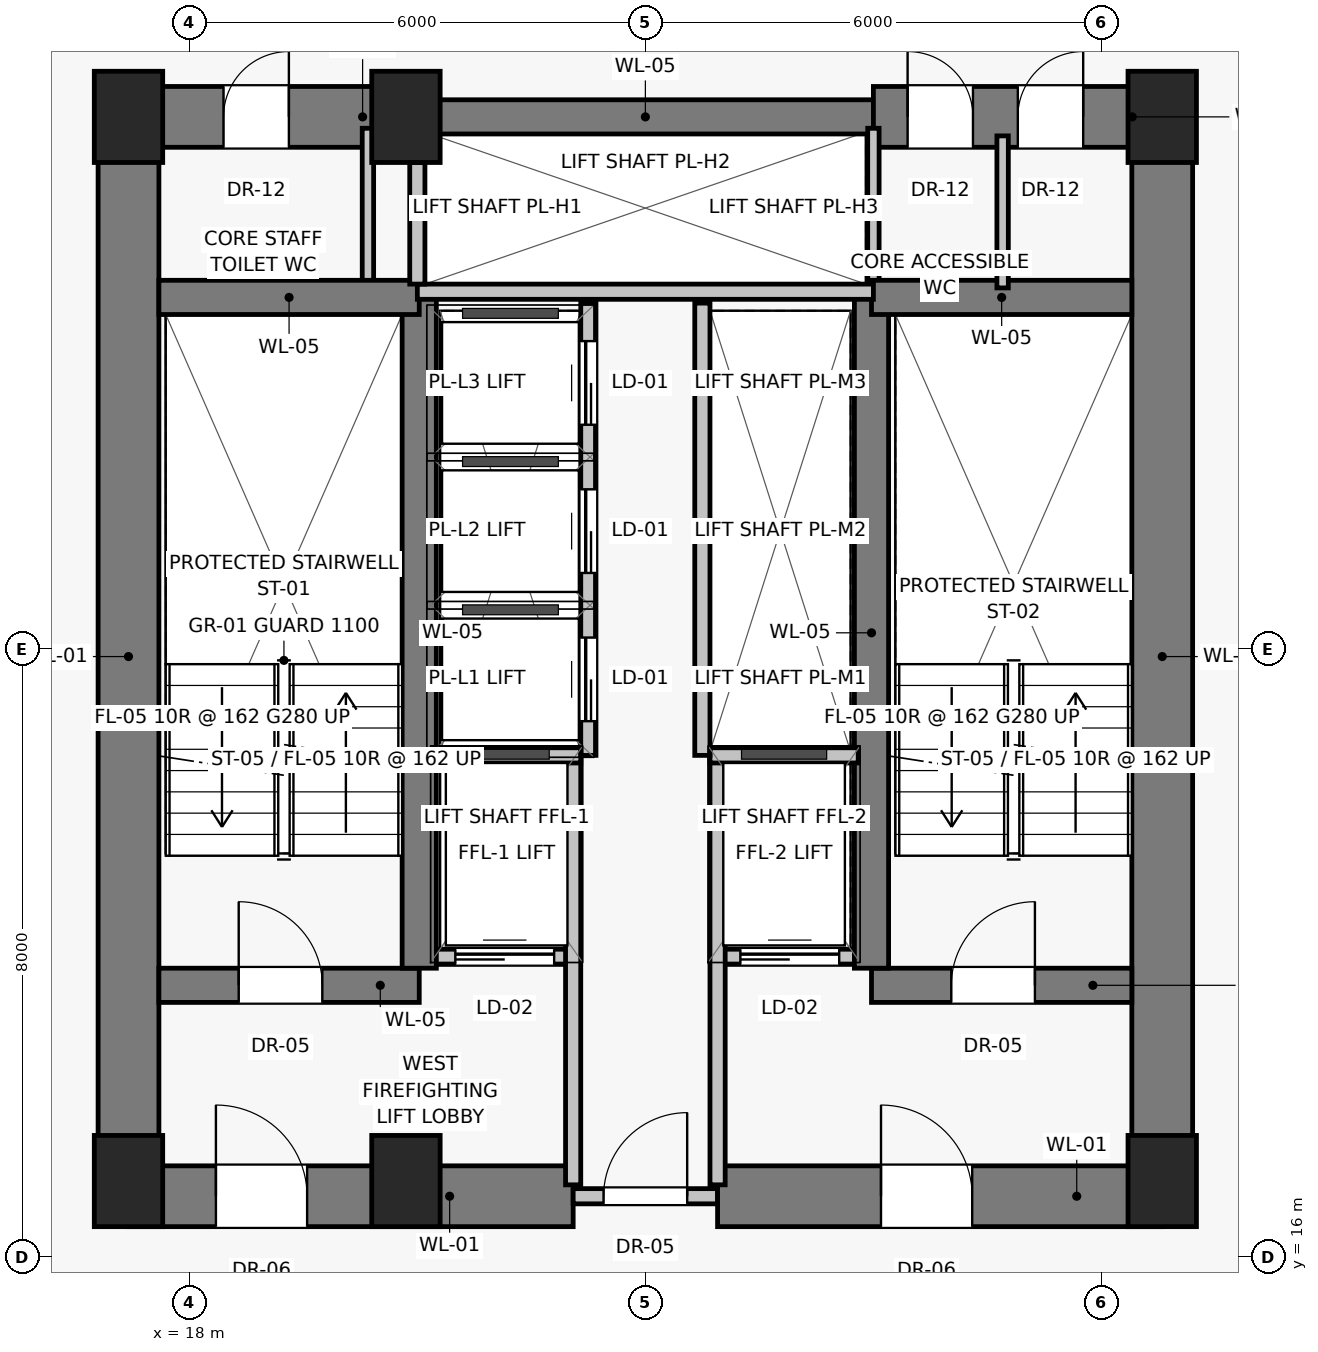
"""IFC4 building model, lengths in metres.
Left out: names, types, materials, properties, quantities, classifications, styles, units other than length and angle.
Written with IfcOpenShell. Run it as: python <this file> out.ifc"""

import sys

from ifc_helpers import new_model, si_unit, direction, frame, frame_2d, origin, origin_2d, place, context, subcontext, project, spatial, rectangle, extrude, source, transform, mapped, element, fill, save


model = new_model("IFC4")
c1 = context("Model", 3, precision=1e-05, world=origin(), true_north=direction((0.0, 1.0)))
c2 = subcontext(c1, "Body", "Model", "MODEL_VIEW")
j1 = project(units=[si_unit("LENGTHUNIT", "METRE"), si_unit("PLANEANGLEUNIT", "RADIAN")], contexts=[c1])
p1 = place(None, origin())
s1 = spatial("IfcSite", under=j1, at=p1, CompositionType="ELEMENT")
p2 = place(p1, origin())
s2 = spatial("IfcBuilding", under=s1, at=p2, CompositionType="ELEMENT")
p3 = place(p2, frame((0.0, 0.0, 64.1)))
s3 = spatial("IfcBuildingStorey", under=s2, at=p3, CompositionType="ELEMENT", Elevation=64.1)
for number, where, z_axis, x_axis in (
    (1, (17.2, 17.0, 0.0), (0.0, 0.0, 1.0), (1.0, 0.0, 0.0)),
    (2, (20.85, 17.0, 0.0), (0.0, 0.0, 1.0), (1.0, 0.0, 0.0)),
    (3, (30.8, 17.0, 0.0), (0.0, 0.0, 1.0), (1.0, 0.0, 0.0)),
    (4, (17.2, 31.0, 0.0), (0.0, 0.0, 1.0), (1.0, 0.0, 0.0)),
    (5, (20.85, 31.0, 0.0), (0.0, 0.0, 1.0), (1.0, 0.0, 0.0)),
    (6, (30.8, 31.0, 0.0), (0.0, 0.0, 1.0), (1.0, 0.0, 0.0)),
):
    element("IfcColumn", number, at=place(p3, frame(where, z_axis=z_axis, x_axis=x_axis)), inside=s3, PredefinedType="PILASTER", context=c2, shape_type="SweptSolid", body=[
        extrude(rectangle(XDim=0.9, YDim=1.2, at=origin_2d()), origin(), (0.0, 0.0, 1.0), 3.25),
    ])
for number, where, z_axis, x_axis in (
    (7, (17.2, 16.8, 0.0), (0.0, 0.0, 1.0), (0.0, 1.0, 0.0)),
    (8, (30.8, 16.8, 0.0), (0.0, 0.0, 1.0), (0.0, 1.0, 0.0)),
):
    element("IfcWall", number, at=place(p3, frame(where, z_axis=z_axis, x_axis=x_axis)), inside=s3, PredefinedType="SHEAR", context=c2, shape_type="SweptSolid", body=[
        extrude(rectangle(XDim=14.2, YDim=0.8, at=frame_2d((7.1, 0.0))), origin(), (0.0, 0.0, 1.0), 3.0),
    ])
p4 = place(p3, frame((17.2, 16.8, 0.0), z_axis=(0.0, 0.0, 1.0), x_axis=(1.0, 0.0, 0.0)))
e9 = element("IfcWall", 9, at=p4, inside=s3, PredefinedType="SHEAR", context=c2, shape_type="SweptSolid", body=[
    extrude(rectangle(XDim=5.85, YDim=0.8, at=frame_2d((2.925, 0.0))), origin(), (0.0, 0.0, 1.0), 3.0),
])
p5 = place(p4, frame((1.15, 0.0, 0.0)))
e10 = element("IfcOpeningElement", 10, at=p5, cuts=e9, PredefinedType="OPENING", context=c2, shape_type="SweptSolid", body=[
    extrude(rectangle(XDim=1.2, YDim=2.03, at=frame_2d((0.6, 1.015))), frame((0.0, 0.41, 0.0), z_axis=(0.0, -1.0, 0.0), x_axis=(1.0, 0.0, 0.0)), (0.0, 0.0, 1.0), 0.82),
])
p6 = place(p3, frame((23.05, 16.8, 0.0), z_axis=(0.0, 0.0, 1.0), x_axis=(1.0, 0.0, 0.0)))
e11 = element("IfcWall", 11, at=p6, inside=s3, PredefinedType="SOLIDWALL", context=c2, shape_type="SweptSolid", body=[
    extrude(rectangle(XDim=1.9, YDim=0.2, at=frame_2d((0.95, 0.0))), origin(), (0.0, 0.0, 1.0), 2.15),
])
p7 = place(p6, frame((0.4, 0.0, 0.0)))
e12 = element("IfcOpeningElement", 12, at=p7, cuts=e11, PredefinedType="OPENING", context=c2, shape_type="SweptSolid", body=[
    extrude(rectangle(XDim=1.1, YDim=2.03, at=frame_2d((0.55, 1.015))), frame((0.0, 0.11, 0.0), z_axis=(0.0, -1.0, 0.0), x_axis=(1.0, 0.0, 0.0)), (0.0, 0.0, 1.0), 0.22),
])
p8 = place(p3, frame((24.95, 16.8, 0.0), z_axis=(0.0, 0.0, 1.0), x_axis=(1.0, 0.0, 0.0)))
e13 = element("IfcWall", 13, at=p8, inside=s3, PredefinedType="SHEAR", context=c2, shape_type="SweptSolid", body=[
    extrude(rectangle(XDim=5.85, YDim=0.8, at=frame_2d((2.925, 0.0))), origin(), (0.0, 0.0, 1.0), 3.0),
])
p9 = place(p8, frame((2.15, 0.0, 0.0)))
e14 = element("IfcOpeningElement", 14, at=p9, cuts=e13, PredefinedType="OPENING", context=c2, shape_type="SweptSolid", body=[
    extrude(rectangle(XDim=1.2, YDim=2.03, at=frame_2d((0.6, 1.015))), frame((0.0, 0.41, 0.0), z_axis=(0.0, -1.0, 0.0), x_axis=(1.0, 0.0, 0.0)), (0.0, 0.0, 1.0), 0.82),
])
p10 = place(p3, frame((17.2, 31.0, 0.0), z_axis=(0.0, 0.0, 1.0), x_axis=(1.0, 0.0, 0.0)))
e15 = element("IfcWall", 15, at=p10, inside=s3, PredefinedType="SHEAR", context=c2, shape_type="SweptSolid", body=[
    extrude(rectangle(XDim=3.8, YDim=0.8, at=frame_2d((1.9, 0.0))), origin(), (0.0, 0.0, 1.0), 3.0),
])
p11 = place(p10, frame((1.25, 0.0, 0.0)))
e16 = element("IfcOpeningElement", 16, at=p11, cuts=e15, PredefinedType="OPENING", context=c2, shape_type="SweptSolid", body=[
    extrude(rectangle(XDim=0.86, YDim=2.01, at=frame_2d((0.43, 1.005))), frame((0.0, 0.41, 0.0), z_axis=(0.0, -1.0, 0.0), x_axis=(1.0, 0.0, 0.0)), (0.0, 0.0, 1.0), 0.82),
])
p12 = place(p3, frame((21.0, 31.0, 0.0), z_axis=(0.0, 0.0, 1.0), x_axis=(1.0, 0.0, 0.0)))
e17 = element("IfcWall", 17, at=p12, inside=s3, PredefinedType="SHEAR", context=c2, shape_type="SweptSolid", body=[
    extrude(rectangle(XDim=6.0, YDim=0.45, at=frame_2d((3.0, 0.0))), origin(), (0.0, 0.0, 1.0), 3.0),
])
p13 = place(p3, frame((27.0, 31.0, 0.0), z_axis=(0.0, 0.0, 1.0), x_axis=(1.0, 0.0, 0.0)))
e18 = element("IfcWall", 18, at=p13, inside=s3, PredefinedType="SHEAR", context=c2, shape_type="SweptSolid", body=[
    extrude(rectangle(XDim=3.8, YDim=0.8, at=frame_2d((1.9, 0.0))), origin(), (0.0, 0.0, 1.0), 3.0),
])
p14 = place(p13, frame((0.45, 0.0, 0.0)))
e19 = element("IfcOpeningElement", 19, at=p14, cuts=e18, PredefinedType="OPENING", context=c2, shape_type="SweptSolid", body=[
    extrude(rectangle(XDim=0.86, YDim=2.01, at=frame_2d((0.43, 1.005))), frame((0.0, 0.41, 0.0), z_axis=(0.0, -1.0, 0.0), x_axis=(1.0, 0.0, 0.0)), (0.0, 0.0, 1.0), 0.82),
])
p15 = place(p13, frame((1.9, 0.0, 0.0)))
e20 = element("IfcOpeningElement", 20, at=p15, cuts=e18, PredefinedType="OPENING", context=c2, shape_type="SweptSolid", body=[
    extrude(rectangle(XDim=0.86, YDim=2.01, at=frame_2d((0.43, 1.005))), frame((0.0, 0.41, 0.0), z_axis=(0.0, -1.0, 0.0), x_axis=(1.0, 0.0, 0.0)), (0.0, 0.0, 1.0), 0.82),
])
for number, where, z_axis, x_axis in (
    (21, (20.35, 28.65, 0.0), (0.0, 0.0, 1.0), (0.0, 1.0, 0.0)),
    (22, (27.0, 28.65, 0.0), (0.0, 0.0, 1.0), (0.0, 1.0, 0.0)),
):
    element("IfcWall", number, at=place(p3, frame(where, z_axis=z_axis, x_axis=x_axis)), inside=s3, PredefinedType="PARTITIONING", context=c2, shape_type="SweptSolid", body=[
        extrude(rectangle(XDim=2.2, YDim=0.15, at=frame_2d((1.1, 0.0))), origin(), (0.0, 0.0, 1.0), 3.0),
    ])
p16 = place(p3, frame((17.6, 19.575, 0.0), z_axis=(0.0, 0.0, 1.0), x_axis=(1.0, 0.0, 0.0)))
e23 = element("IfcWall", 23, at=p16, inside=s3, PredefinedType="SHEAR", context=c2, shape_type="SweptSolid", body=[
    extrude(rectangle(XDim=3.425, YDim=0.45, at=frame_2d((1.712, 0.0))), origin(), (0.0, 0.0, 1.0), 3.0),
])
p17 = place(p16, frame((1.05, 0.0, 0.0)))
e24 = element("IfcOpeningElement", 24, at=p17, cuts=e23, PredefinedType="OPENING", context=c2, shape_type="SweptSolid", body=[
    extrude(rectangle(XDim=1.1, YDim=2.03, at=frame_2d((0.55, 1.015))), frame((0.0, 0.235, 0.0), z_axis=(0.0, -1.0, 0.0), x_axis=(1.0, 0.0, 0.0)), (0.0, 0.0, 1.0), 0.47),
])
p18 = place(p3, frame((21.2, 19.95, 0.0), z_axis=(0.0, 0.0, 1.0), x_axis=(1.0, 0.0, 0.0)))
e25 = element("IfcWall", 25, at=p18, inside=s3, PredefinedType="SOLIDWALL", context=c2, shape_type="SweptSolid", body=[
    extrude(rectangle(XDim=1.85, YDim=0.2, at=frame_2d((0.925, 0.0))), origin(), (0.0, 0.0, 1.0), 3.0),
])
p19 = place(p18, frame((0.3, 0.0, 0.0)))
e26 = element("IfcOpeningElement", 26, at=p19, cuts=e25, PredefinedType="OPENING", context=c2, shape_type="SweptSolid", body=[
    extrude(rectangle(XDim=1.3, YDim=2.25, at=frame_2d((0.65, 1.125))), frame((0.0, 0.11, 0.0), z_axis=(0.0, -1.0, 0.0), x_axis=(1.0, 0.0, 0.0)), (0.0, 0.0, 1.0), 0.22),
])
p20 = place(p3, frame((24.95, 19.95, 0.0), z_axis=(0.0, 0.0, 1.0), x_axis=(1.0, 0.0, 0.0)))
e27 = element("IfcWall", 27, at=p20, inside=s3, PredefinedType="SOLIDWALL", context=c2, shape_type="SweptSolid", body=[
    extrude(rectangle(XDim=1.85, YDim=0.2, at=frame_2d((0.925, 0.0))), origin(), (0.0, 0.0, 1.0), 3.0),
])
p21 = place(p20, frame((0.3, 0.0, 0.0)))
e28 = element("IfcOpeningElement", 28, at=p21, cuts=e27, PredefinedType="OPENING", context=c2, shape_type="SweptSolid", body=[
    extrude(rectangle(XDim=1.3, YDim=2.25, at=frame_2d((0.65, 1.125))), frame((0.0, 0.11, 0.0), z_axis=(0.0, -1.0, 0.0), x_axis=(1.0, 0.0, 0.0)), (0.0, 0.0, 1.0), 0.22),
])
p22 = place(p3, frame((26.975, 19.575, 0.0), z_axis=(0.0, 0.0, 1.0), x_axis=(1.0, 0.0, 0.0)))
e29 = element("IfcWall", 29, at=p22, inside=s3, PredefinedType="SHEAR", context=c2, shape_type="SweptSolid", body=[
    extrude(rectangle(XDim=3.425, YDim=0.45, at=frame_2d((1.712, 0.0))), origin(), (0.0, 0.0, 1.0), 3.0),
])
p23 = place(p22, frame((1.05, 0.0, 0.0)))
e30 = element("IfcOpeningElement", 30, at=p23, cuts=e29, PredefinedType="OPENING", context=c2, shape_type="SweptSolid", body=[
    extrude(rectangle(XDim=1.1, YDim=2.03, at=frame_2d((0.55, 1.015))), frame((0.0, 0.235, 0.0), z_axis=(0.0, -1.0, 0.0), x_axis=(1.0, 0.0, 0.0)), (0.0, 0.0, 1.0), 0.47),
])
for number, where, z_axis, x_axis in (
    (31, (21.025, 19.8, 0.0), (0.0, 0.0, 1.0), (0.0, 1.0, 0.0)),
    (32, (26.975, 19.8, 0.0), (0.0, 0.0, 1.0), (0.0, 1.0, 0.0)),
):
    element("IfcWall", number, at=place(p3, frame(where, z_axis=z_axis, x_axis=x_axis)), inside=s3, PredefinedType="SHEAR", context=c2, shape_type="SweptSolid", body=[
        extrude(rectangle(XDim=8.825, YDim=0.45, at=frame_2d((4.413, 0.0))), origin(), (0.0, 0.0, 1.0), 3.0),
    ])
for number, where, z_axis, x_axis in (
    (33, (17.6, 28.625, 0.0), (0.0, 0.0, 1.0), (1.0, 0.0, 0.0)),
    (34, (26.975, 28.625, 0.0), (0.0, 0.0, 1.0), (1.0, 0.0, 0.0)),
):
    element("IfcWall", number, at=place(p3, frame(where, z_axis=z_axis, x_axis=x_axis)), inside=s3, PredefinedType="SHEAR", context=c2, shape_type="SweptSolid", body=[
        extrude(rectangle(XDim=3.425, YDim=0.45, at=frame_2d((1.712, 0.0))), origin(), (0.0, 0.0, 1.0), 3.0),
    ])
for number, where, z_axis, x_axis in (
    (35, (23.05, 16.95, 0.0), (0.0, 0.0, 1.0), (0.0, 1.0, 0.0)),
    (36, (24.95, 16.95, 0.0), (0.0, 0.0, 1.0), (0.0, 1.0, 0.0)),
):
    element("IfcWall", number, at=place(p3, frame(where, z_axis=z_axis, x_axis=x_axis)), inside=s3, PredefinedType="SOLIDWALL", context=c2, shape_type="SweptSolid", body=[
        extrude(rectangle(XDim=5.6, YDim=0.2, at=frame_2d((2.8, 0.0))), origin(), (0.0, 0.0, 1.0), 3.0),
    ])
for number, where, z_axis, x_axis in (
    (37, (21.2, 22.6, 0.0), (0.0, 0.0, 1.0), (1.0, 0.0, 0.0)),
    (38, (24.85, 22.6, 0.0), (0.0, 0.0, 1.0), (1.0, 0.0, 0.0)),
):
    element("IfcWall", number, at=place(p3, frame(where, z_axis=z_axis, x_axis=x_axis)), inside=s3, PredefinedType="SOLIDWALL", context=c2, shape_type="SweptSolid", body=[
        extrude(rectangle(XDim=1.95, YDim=0.2, at=frame_2d((0.975, 0.0))), origin(), (0.0, 0.0, 1.0), 3.0),
    ])
p24 = place(p3, frame((21.0, 28.7, 0.0), z_axis=(0.0, 0.0, 1.0), x_axis=(1.0, 0.0, 0.0)))
e39 = element("IfcWall", 39, at=p24, inside=s3, PredefinedType="SOLIDWALL", context=c2, shape_type="SweptSolid", body=[
    extrude(rectangle(XDim=6.0, YDim=0.2, at=frame_2d((3.0, 0.0))), origin(), (0.0, 0.0, 1.0), 3.0),
])
p25 = place(p3, frame((21.0, 28.8, 0.0), z_axis=(0.0, 0.0, 1.0), x_axis=(0.0, 1.0, 0.0)))
e40 = element("IfcWall", 40, at=p25, inside=s3, PredefinedType="SOLIDWALL", context=c2, shape_type="SweptSolid", body=[
    extrude(rectangle(XDim=1.6, YDim=0.2, at=frame_2d((0.8, 0.0))), origin(), (0.0, 0.0, 1.0), 3.0),
])
p26 = place(p3, frame((23.25, 22.6, 0.0), z_axis=(0.0, 0.0, 1.0), x_axis=(0.0, 1.0, 0.0)))
e41 = element("IfcWall", 41, at=p26, inside=s3, PredefinedType="SOLIDWALL", context=c2, shape_type="SweptSolid", body=[
    extrude(rectangle(XDim=5.95, YDim=0.2, at=frame_2d((2.975, 0.0))), origin(), (0.0, 0.0, 1.0), 3.0),
])
p27 = place(p26, frame((0.45, 0.0, 0.0)))
e42 = element("IfcOpeningElement", 42, at=p27, cuts=e41, PredefinedType="OPENING", context=c2, shape_type="SweptSolid", body=[
    extrude(rectangle(XDim=1.1, YDim=2.08, at=frame_2d((0.55, 1.04))), frame((0.0, 0.11, 0.0), z_axis=(0.0, -1.0, 0.0), x_axis=(1.0, 0.0, 0.0)), (0.0, 0.0, 1.0), 0.22),
])
p28 = place(p26, frame((2.4, 0.0, 0.0)))
e43 = element("IfcOpeningElement", 43, at=p28, cuts=e41, PredefinedType="OPENING", context=c2, shape_type="SweptSolid", body=[
    extrude(rectangle(XDim=1.1, YDim=2.08, at=frame_2d((0.55, 1.04))), frame((0.0, 0.11, 0.0), z_axis=(0.0, -1.0, 0.0), x_axis=(1.0, 0.0, 0.0)), (0.0, 0.0, 1.0), 0.22),
])
p29 = place(p26, frame((4.35, 0.0, 0.0)))
e44 = element("IfcOpeningElement", 44, at=p29, cuts=e41, PredefinedType="OPENING", context=c2, shape_type="SweptSolid", body=[
    extrude(rectangle(XDim=1.1, YDim=2.08, at=frame_2d((0.55, 1.04))), frame((0.0, 0.11, 0.0), z_axis=(0.0, -1.0, 0.0), x_axis=(1.0, 0.0, 0.0)), (0.0, 0.0, 1.0), 0.22),
])
p30 = place(p3, frame((24.75, 22.6, 0.0), z_axis=(0.0, 0.0, 1.0), x_axis=(0.0, 1.0, 0.0)))
e45 = element("IfcWall", 45, at=p30, inside=s3, PredefinedType="SOLIDWALL", context=c2, shape_type="SweptSolid", body=[
    extrude(rectangle(XDim=5.95, YDim=0.2, at=frame_2d((2.975, 0.0))), origin(), (0.0, 0.0, 1.0), 3.0),
])
p31 = place(p3, frame((28.7, 28.75, 0.0), z_axis=(0.0, 0.0, 1.0), x_axis=(0.0, 1.0, 0.0)))
e46 = element("IfcWall", 46, at=p31, inside=s3, PredefinedType="PARTITIONING", context=c2, shape_type="SweptSolid", body=[
    extrude(rectangle(XDim=2.0, YDim=0.15, at=frame_2d((1.0, 0.0))), origin(), (0.0, 0.0, 1.0), 3.0),
])
m1 = source(origin(), c2, "Body", "SweptSolid", [
    extrude(rectangle(XDim=1.2, YDim=2.03, at=frame_2d((0.6, 1.015))), frame((0.0, 0.025, 0.0), z_axis=(0.0, -1.0, 0.0), x_axis=(1.0, 0.0, 0.0)), (0.0, 0.0, 1.0), 0.05),
])
p32 = place(p5, origin())
e47 = element("IfcDoor", 47, at=p32, inside=s3, OperationType="SINGLE_SWING_LEFT", PredefinedType="DOOR", context=c2, shape_type="MappedRepresentation", body=[
    mapped(m1, transform((0.0, 0.0, 0.0), scale=1.0)),
])
fill(e10, e47)
m2 = source(origin(), c2, "Body", "SweptSolid", [
    extrude(rectangle(XDim=1.1, YDim=2.03, at=frame_2d((0.55, 1.015))), frame((0.0, 0.025, 0.0), z_axis=(0.0, -1.0, 0.0), x_axis=(1.0, 0.0, 0.0)), (0.0, 0.0, 1.0), 0.05),
])
p33 = place(p7, origin())
e48 = element("IfcDoor", 48, at=p33, inside=s3, OperationType="SINGLE_SWING_RIGHT", PredefinedType="DOOR", context=c2, shape_type="MappedRepresentation", body=[
    mapped(m2, transform((0.0, 0.0, 0.0), scale=1.0)),
])
fill(e12, e48)
p34 = place(p9, origin())
e49 = element("IfcDoor", 49, at=p34, inside=s3, OperationType="SINGLE_SWING_LEFT", PredefinedType="DOOR", context=c2, shape_type="MappedRepresentation", body=[
    mapped(m1, transform((0.0, 0.0, 0.0), scale=1.0)),
])
fill(e14, e49)
m3 = source(origin(), c2, "Body", "SweptSolid", [
    extrude(rectangle(XDim=0.86, YDim=2.01, at=frame_2d((0.43, 1.005))), frame((0.0, 0.025, 0.0), z_axis=(0.0, -1.0, 0.0), x_axis=(1.0, 0.0, 0.0)), (0.0, 0.0, 1.0), 0.05),
])
p35 = place(p11, origin())
e50 = element("IfcDoor", 50, at=p35, inside=s3, OperationType="SINGLE_SWING_RIGHT", PredefinedType="DOOR", context=c2, shape_type="MappedRepresentation", body=[
    mapped(m3, transform((0.0, 0.0, 0.0), scale=1.0)),
])
fill(e16, e50)
p36 = place(p14, origin())
e51 = element("IfcDoor", 51, at=p36, inside=s3, OperationType="SINGLE_SWING_LEFT", PredefinedType="DOOR", context=c2, shape_type="MappedRepresentation", body=[
    mapped(m3, transform((0.0, 0.0, 0.0), scale=1.0)),
])
fill(e19, e51)
p37 = place(p15, origin())
e52 = element("IfcDoor", 52, at=p37, inside=s3, OperationType="SINGLE_SWING_RIGHT", PredefinedType="DOOR", context=c2, shape_type="MappedRepresentation", body=[
    mapped(m3, transform((0.0, 0.0, 0.0), scale=1.0)),
])
fill(e20, e52)
p38 = place(p17, origin())
e53 = element("IfcDoor", 53, at=p38, inside=s3, OperationType="SINGLE_SWING_LEFT", PredefinedType="DOOR", context=c2, shape_type="MappedRepresentation", body=[
    mapped(m2, transform((0.0, 0.0, 0.0), scale=1.0)),
])
fill(e24, e53)
m4 = source(origin(), c2, "Body", "SweptSolid", [
    extrude(rectangle(XDim=1.3, YDim=2.25, at=frame_2d((0.65, 1.125))), frame((0.0, 0.025, 0.0), z_axis=(0.0, -1.0, 0.0), x_axis=(1.0, 0.0, 0.0)), (0.0, 0.0, 1.0), 0.05),
])
p39 = place(p19, origin())
e54 = element("IfcDoor", 54, at=p39, inside=s3, OperationType="SLIDING_TO_LEFT", PredefinedType="DOOR", context=c2, shape_type="MappedRepresentation", body=[
    mapped(m4, transform((0.0, 0.0, 0.0), scale=1.0)),
])
fill(e26, e54)
p40 = place(p21, origin())
e55 = element("IfcDoor", 55, at=p40, inside=s3, OperationType="SLIDING_TO_LEFT", PredefinedType="DOOR", context=c2, shape_type="MappedRepresentation", body=[
    mapped(m4, transform((0.0, 0.0, 0.0), scale=1.0)),
])
fill(e28, e55)
p41 = place(p23, origin())
e56 = element("IfcDoor", 56, at=p41, inside=s3, OperationType="SINGLE_SWING_RIGHT", PredefinedType="DOOR", context=c2, shape_type="MappedRepresentation", body=[
    mapped(m2, transform((0.0, 0.0, 0.0), scale=1.0)),
])
fill(e30, e56)
m5 = source(origin(), c2, "Body", "SweptSolid", [
    extrude(rectangle(XDim=1.1, YDim=2.08, at=frame_2d((0.55, 1.04))), frame((0.0, 0.025, 0.0), z_axis=(0.0, -1.0, 0.0), x_axis=(1.0, 0.0, 0.0)), (0.0, 0.0, 1.0), 0.05),
])
p42 = place(p27, origin())
e57 = element("IfcDoor", 57, at=p42, inside=s3, OperationType="SLIDING_TO_LEFT", PredefinedType="DOOR", context=c2, shape_type="MappedRepresentation", body=[
    mapped(m5, transform((0.0, 0.0, 0.0), scale=1.0)),
])
fill(e42, e57)
p43 = place(p28, origin())
e58 = element("IfcDoor", 58, at=p43, inside=s3, OperationType="SLIDING_TO_LEFT", PredefinedType="DOOR", context=c2, shape_type="MappedRepresentation", body=[
    mapped(m5, transform((0.0, 0.0, 0.0), scale=1.0)),
])
fill(e43, e58)
p44 = place(p29, origin())
e59 = element("IfcDoor", 59, at=p44, inside=s3, OperationType="SLIDING_TO_LEFT", PredefinedType="DOOR", context=c2, shape_type="MappedRepresentation", body=[
    mapped(m5, transform((0.0, 0.0, 0.0), scale=1.0)),
])
fill(e44, e59)
save(model, sys.argv[1])
